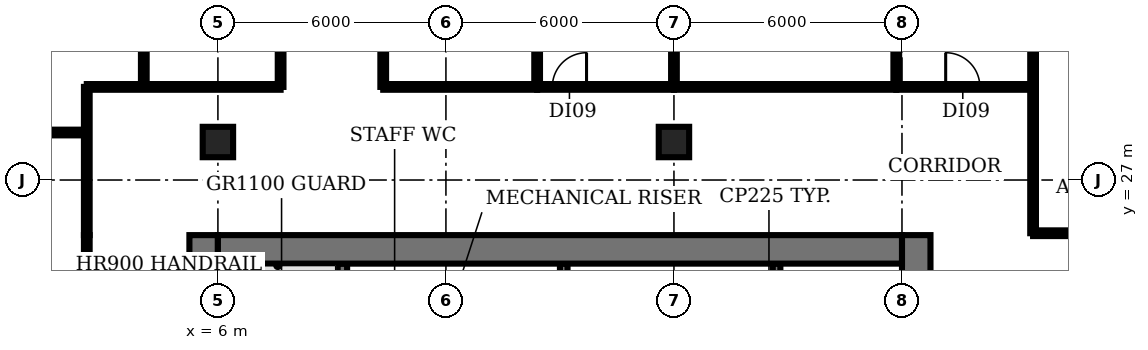
"""IFC4 building model, lengths in metres.
Left out: names, types, materials, properties, quantities, classifications, styles, units other than length and angle.
Written with IfcOpenShell. Run it as: python <this file> out.ifc"""

import sys

from ifc_helpers import new_model, si_unit, direction, frame, frame_2d, origin, origin_2d, place, context, subcontext, project, spatial, rectangle, extrude, element, fill, save


model = new_model("IFC4")
c1 = context("Model", 3, precision=1e-05, world=origin(), true_north=direction((0.0, 1.0)))
c2 = subcontext(c1, "Body", "Model", "MODEL_VIEW")
j1 = project(units=[si_unit("LENGTHUNIT", "METRE"), si_unit("PLANEANGLEUNIT", "RADIAN")], contexts=[c1])
p1 = place(None, origin())
s1 = spatial("IfcSite", under=j1, at=p1, CompositionType="ELEMENT")
p2 = place(p1, origin())
s2 = spatial("IfcBuilding", under=s1, at=p2, CompositionType="ELEMENT")
p3 = place(p2, frame((0.0, 0.0, 100.4)))
s3 = spatial("IfcBuildingStorey", under=s2, at=p3, CompositionType="ELEMENT", Elevation=100.4)
for number, where, z_axis, x_axis in (
    (1, (6.0, 28.0, 0.0), (0.0, 0.0, 1.0), (1.0, 0.0, 0.0)),
    (2, (18.0, 28.0, 0.0), (0.0, 0.0, 1.0), (1.0, 0.0, 0.0)),
):
    element("IfcColumn", number, at=place(p3, frame(where, z_axis=z_axis, x_axis=x_axis)), inside=s3, PredefinedType="COLUMN", context=c2, shape_type="SweptSolid", body=[
        extrude(rectangle(XDim=0.8, YDim=0.8, at=origin_2d()), origin(), (0.0, 0.0, 1.0), 3.85),
    ])
p4 = place(p3, frame((9.275, 18.375, 0.0), z_axis=(0.0, 0.0, 1.0), x_axis=(0.0, 1.0, 0.0)))
e3 = element("IfcWall", 3, at=p4, inside=s3, PredefinedType="SHEAR", context=c2, shape_type="SweptSolid", body=[
    extrude(rectangle(XDim=6.425, YDim=0.25, at=frame_2d((3.212, 0.0))), origin(), (0.0, 0.0, 1.0), 3.85),
])
for number, where, z_axis, x_axis in (
    (4, (15.1, 22.9, 0.0), (0.0, 0.0, 1.0), (0.0, 1.0, 0.0)),
    (5, (20.7, 22.9, 0.0), (0.0, 0.0, 1.0), (0.0, 1.0, 0.0)),
):
    element("IfcWall", number, at=place(p3, frame(where, z_axis=z_axis, x_axis=x_axis)), inside=s3, PredefinedType="SHEAR", context=c2, shape_type="SweptSolid", body=[
        extrude(rectangle(XDim=1.9, YDim=0.2, at=frame_2d((0.95, 0.0))), origin(), (0.0, 0.0, 1.0), 3.85),
    ])
p5 = place(p3, frame((5.625, 4.47, 0.0), z_axis=(0.0, 0.0, 1.0), x_axis=(0.0, 1.0, 0.0)))
e6 = element("IfcWall", 6, at=p5, inside=s3, PredefinedType="SHEAR", context=c2, shape_type="SweptSolid", body=[
    extrude(rectangle(XDim=21.08, YDim=0.75, at=frame_2d((10.54, 0.0))), origin(), (0.0, 0.0, 1.0), 3.85),
])
p6 = place(p5, frame((1.18, 0.0, 0.0)))
e7 = element("IfcOpeningElement", 7, at=p6, cuts=e6, PredefinedType="OPENING", context=c2, shape_type="SweptSolid", body=[
    extrude(rectangle(XDim=1.5, YDim=2.1, at=frame_2d((0.75, 1.05))), frame((0.0, 0.385, 0.0), z_axis=(0.0, -1.0, 0.0), x_axis=(1.0, 0.0, 0.0)), (0.0, 0.0, 1.0), 0.77),
])
p7 = place(p5, frame((7.63, 0.0, 0.0)))
e8 = element("IfcOpeningElement", 8, at=p7, cuts=e6, PredefinedType="OPENING", context=c2, shape_type="SweptSolid", body=[
    extrude(rectangle(XDim=1.2, YDim=2.1, at=frame_2d((0.6, 1.05))), frame((0.0, 0.385, 0.0), z_axis=(0.0, -1.0, 0.0), x_axis=(1.0, 0.0, 0.0)), (0.0, 0.0, 1.0), 0.77),
])
p8 = place(p5, frame((14.18, 0.0, 0.0)))
e9 = element("IfcOpeningElement", 9, at=p8, cuts=e6, PredefinedType="OPENING", context=c2, shape_type="SweptSolid", body=[
    extrude(rectangle(XDim=1.2, YDim=2.1, at=frame_2d((0.6, 1.05))), frame((0.0, 0.385, 0.0), z_axis=(0.0, -1.0, 0.0), x_axis=(1.0, 0.0, 0.0)), (0.0, 0.0, 1.0), 0.77),
])
p9 = place(p3, frame((24.375, 25.55, 0.0), z_axis=(0.0, 0.0, 1.0), x_axis=(0.0, -1.0, 0.0)))
e10 = element("IfcWall", 10, at=p9, inside=s3, PredefinedType="SHEAR", context=c2, shape_type="SweptSolid", body=[
    extrude(rectangle(XDim=21.13, YDim=0.75, at=frame_2d((10.565, 0.0))), origin(), (0.0, 0.0, 1.0), 3.85),
])
p10 = place(p9, frame((18.4, 0.0, 0.0)))
e11 = element("IfcOpeningElement", 11, at=p10, cuts=e10, PredefinedType="OPENING", context=c2, shape_type="SweptSolid", body=[
    extrude(rectangle(XDim=1.5, YDim=2.1, at=frame_2d((0.75, 1.05))), frame((0.0, 0.385, 0.0), z_axis=(0.0, -1.0, 0.0), x_axis=(1.0, 0.0, 0.0)), (0.0, 0.0, 1.0), 0.77),
])
p11 = place(p9, frame((12.3, 0.0, 0.0)))
e12 = element("IfcOpeningElement", 12, at=p11, cuts=e10, PredefinedType="OPENING", context=c2, shape_type="SweptSolid", body=[
    extrude(rectangle(XDim=0.9, YDim=2.1, at=frame_2d((0.45, 1.05))), frame((0.0, 0.385, 0.0), z_axis=(0.0, -1.0, 0.0), x_axis=(1.0, 0.0, 0.0)), (0.0, 0.0, 1.0), 0.77),
])
p12 = place(p9, frame((6.3, 0.0, 0.0)))
e13 = element("IfcOpeningElement", 13, at=p12, cuts=e10, PredefinedType="OPENING", context=c2, shape_type="SweptSolid", body=[
    extrude(rectangle(XDim=2.0, YDim=2.1, at=frame_2d((1.0, 1.05))), frame((0.0, 0.385, 0.0), z_axis=(0.0, -1.0, 0.0), x_axis=(1.0, 0.0, 0.0)), (0.0, 0.0, 1.0), 0.77),
])
p13 = place(p3, frame((6.0, 25.175, 0.0), z_axis=(0.0, 0.0, 1.0), x_axis=(1.0, 0.0, 0.0)))
e14 = element("IfcWall", 14, at=p13, inside=s3, PredefinedType="SHEAR", context=c2, shape_type="SweptSolid", body=[
    extrude(rectangle(XDim=18.0, YDim=0.75, at=frame_2d((9.0, 0.0))), origin(), (0.0, 0.0, 1.0), 3.85),
])
p14 = place(p3, frame((-0.98, 28.25, 0.0), z_axis=(0.0, 0.0, 1.0), x_axis=(1.0, 0.0, 0.0)))
e15 = element("IfcWall", 15, at=p14, inside=s3, PredefinedType="PARTITIONING", context=c2, shape_type="SweptSolid", body=[
    extrude(rectangle(XDim=3.53, YDim=0.15, at=frame_2d((1.765, 0.0))), origin(), (0.0, 0.0, 1.0), 2.83),
])
p15 = place(p3, frame((2.55, 6.34, 0.0), z_axis=(0.0, 0.0, 1.0), x_axis=(0.0, 1.0, 0.0)))
e16 = element("IfcWall", 16, at=p15, inside=s3, PredefinedType="PARTITIONING", context=c2, shape_type="SweptSolid", body=[
    extrude(rectangle(XDim=19.21, YDim=0.15, at=frame_2d((9.605, 0.0))), origin(), (0.0, 0.0, 1.0), 2.83),
])
p16 = place(p15, frame((7.31, 0.0, 0.0)))
e17 = element("IfcOpeningElement", 17, at=p16, cuts=e16, PredefinedType="OPENING", context=c2, shape_type="SweptSolid", body=[
    extrude(rectangle(XDim=1.2, YDim=2.1, at=frame_2d((0.6, 1.05))), frame((0.0, 0.085, 0.0), z_axis=(0.0, -1.0, 0.0), x_axis=(1.0, 0.0, 0.0)), (0.0, 0.0, 1.0), 0.17),
])
p17 = place(p3, frame((2.55, 25.55, 0.0), z_axis=(0.0, 0.0, 1.0), x_axis=(0.0, 1.0, 0.0)))
e18 = element("IfcWall", 18, at=p17, inside=s3, PredefinedType="PARTITIONING", context=c2, shape_type="SweptSolid", body=[
    extrude(rectangle(XDim=3.9, YDim=0.15, at=frame_2d((1.95, 0.0))), origin(), (0.0, 0.0, 1.0), 2.83),
])
p18 = place(p3, frame((2.55, 29.45, 0.0), z_axis=(0.0, 0.0, 1.0), x_axis=(1.0, 0.0, 0.0)))
e19 = element("IfcWall", 19, at=p18, inside=s3, PredefinedType="PARTITIONING", context=c2, shape_type="SweptSolid", body=[
    extrude(rectangle(XDim=5.1, YDim=0.15, at=frame_2d((2.55, 0.0))), origin(), (0.0, 0.0, 1.0), 2.83),
])
p19 = place(p3, frame((4.05, 29.45, 0.0), z_axis=(0.0, 0.0, 1.0), x_axis=(0.0, 1.0, 0.0)))
e20 = element("IfcWall", 20, at=p19, inside=s3, PredefinedType="PARTITIONING", context=c2, shape_type="SweptSolid", body=[
    extrude(rectangle(XDim=4.8, YDim=0.15, at=frame_2d((2.4, 0.0))), origin(), (0.0, 0.0, 1.0), 2.83),
])
p20 = place(p3, frame((7.65, 29.45, 0.0), z_axis=(0.0, 0.0, 1.0), x_axis=(0.0, 1.0, 0.0)))
e21 = element("IfcWall", 21, at=p20, inside=s3, PredefinedType="PARTITIONING", context=c2, shape_type="SweptSolid", body=[
    extrude(rectangle(XDim=4.8, YDim=0.15, at=frame_2d((2.4, 0.0))), origin(), (0.0, 0.0, 1.0), 2.83),
])
p21 = place(p20, frame((1.9, 0.0, 0.0)))
e22 = element("IfcOpeningElement", 22, at=p21, cuts=e21, PredefinedType="OPENING", context=c2, shape_type="SweptSolid", body=[
    extrude(rectangle(XDim=0.9, YDim=2.1, at=frame_2d((0.45, 1.05))), frame((0.0, 0.085, 0.0), z_axis=(0.0, -1.0, 0.0), x_axis=(1.0, 0.0, 0.0)), (0.0, 0.0, 1.0), 0.17),
])
p22 = place(p3, frame((10.35, 29.45, 0.0), z_axis=(0.0, 0.0, 1.0), x_axis=(0.0, 1.0, 0.0)))
e23 = element("IfcWall", 23, at=p22, inside=s3, PredefinedType="PARTITIONING", context=c2, shape_type="SweptSolid", body=[
    extrude(rectangle(XDim=4.8, YDim=0.15, at=frame_2d((2.4, 0.0))), origin(), (0.0, 0.0, 1.0), 2.83),
])
p23 = place(p3, frame((10.35, 29.45, 0.0), z_axis=(0.0, 0.0, 1.0), x_axis=(1.0, 0.0, 0.0)))
e24 = element("IfcWall", 24, at=p23, inside=s3, PredefinedType="PARTITIONING", context=c2, shape_type="SweptSolid", body=[
    extrude(rectangle(XDim=4.05, YDim=0.15, at=frame_2d((2.025, 0.0))), origin(), (0.0, 0.0, 1.0), 2.83),
])
p24 = place(p3, frame((14.4, 29.45, 0.0), z_axis=(0.0, 0.0, 1.0), x_axis=(0.0, 1.0, 0.0)))
e25 = element("IfcWall", 25, at=p24, inside=s3, PredefinedType="PARTITIONING", context=c2, shape_type="SweptSolid", body=[
    extrude(rectangle(XDim=4.8, YDim=0.15, at=frame_2d((2.4, 0.0))), origin(), (0.0, 0.0, 1.0), 2.83),
])
p25 = place(p3, frame((14.4, 29.45, 0.0), z_axis=(0.0, 0.0, 1.0), x_axis=(1.0, 0.0, 0.0)))
e26 = element("IfcWall", 26, at=p25, inside=s3, PredefinedType="PARTITIONING", context=c2, shape_type="SweptSolid", body=[
    extrude(rectangle(XDim=3.6, YDim=0.15, at=frame_2d((1.8, 0.0))), origin(), (0.0, 0.0, 1.0), 2.83),
])
p26 = place(p25, frame((0.4, 0.0, 0.0)))
e27 = element("IfcOpeningElement", 27, at=p26, cuts=e26, PredefinedType="OPENING", context=c2, shape_type="SweptSolid", body=[
    extrude(rectangle(XDim=0.9, YDim=2.1, at=frame_2d((0.45, 1.05))), frame((0.0, 0.085, 0.0), z_axis=(0.0, -1.0, 0.0), x_axis=(1.0, 0.0, 0.0)), (0.0, 0.0, 1.0), 0.17),
])
p27 = place(p3, frame((18.0, 29.45, 0.0), z_axis=(0.0, 0.0, 1.0), x_axis=(0.0, 1.0, 0.0)))
e28 = element("IfcWall", 28, at=p27, inside=s3, PredefinedType="PARTITIONING", context=c2, shape_type="SweptSolid", body=[
    extrude(rectangle(XDim=4.8, YDim=0.15, at=frame_2d((2.4, 0.0))), origin(), (0.0, 0.0, 1.0), 2.83),
])
p28 = place(p3, frame((18.0, 29.45, 0.0), z_axis=(0.0, 0.0, 1.0), x_axis=(1.0, 0.0, 0.0)))
e29 = element("IfcWall", 29, at=p28, inside=s3, PredefinedType="PARTITIONING", context=c2, shape_type="SweptSolid", body=[
    extrude(rectangle(XDim=5.85, YDim=0.15, at=frame_2d((2.925, 0.0))), origin(), (0.0, 0.0, 1.0), 2.83),
])
p29 = place(p3, frame((23.85, 29.45, 0.0), z_axis=(0.0, 0.0, 1.0), x_axis=(0.0, 1.0, 0.0)))
e30 = element("IfcWall", 30, at=p29, inside=s3, PredefinedType="PARTITIONING", context=c2, shape_type="SweptSolid", body=[
    extrude(rectangle(XDim=4.8, YDim=0.15, at=frame_2d((2.4, 0.0))), origin(), (0.0, 0.0, 1.0), 2.83),
])
p30 = place(p3, frame((23.85, 29.45, 0.0), z_axis=(0.0, 0.0, 1.0), x_axis=(1.0, 0.0, 0.0)))
e31 = element("IfcWall", 31, at=p30, inside=s3, PredefinedType="PARTITIONING", context=c2, shape_type="SweptSolid", body=[
    extrude(rectangle(XDim=3.6, YDim=0.15, at=frame_2d((1.8, 0.0))), origin(), (0.0, 0.0, 1.0), 2.83),
])
p31 = place(p30, frame((1.3, 0.0, 0.0)))
e32 = element("IfcOpeningElement", 32, at=p31, cuts=e31, PredefinedType="OPENING", context=c2, shape_type="SweptSolid", body=[
    extrude(rectangle(XDim=0.9, YDim=2.1, at=frame_2d((0.45, 1.05))), frame((0.0, 0.085, 0.0), z_axis=(0.0, -1.0, 0.0), x_axis=(1.0, 0.0, 0.0)), (0.0, 0.0, 1.0), 0.17),
])
p32 = place(p3, frame((27.45, 25.6, 0.0), z_axis=(0.0, 0.0, 1.0), x_axis=(0.0, 1.0, 0.0)))
e33 = element("IfcWall", 33, at=p32, inside=s3, PredefinedType="PARTITIONING", context=c2, shape_type="SweptSolid", body=[
    extrude(rectangle(XDim=3.85, YDim=0.15, at=frame_2d((1.925, 0.0))), origin(), (0.0, 0.0, 1.0), 2.83),
])
p33 = place(p3, frame((27.45, 25.6, 0.0), z_axis=(0.0, 0.0, 1.0), x_axis=(1.0, 0.0, 0.0)))
e34 = element("IfcWall", 34, at=p33, inside=s3, PredefinedType="PARTITIONING", context=c2, shape_type="SweptSolid", body=[
    extrude(rectangle(XDim=8.55, YDim=0.15, at=frame_2d((4.275, 0.0))), origin(), (0.0, 0.0, 1.0), 2.83),
])
p34 = place(p33, frame((4.15, 0.0, 0.0)))
e35 = element("IfcOpeningElement", 35, at=p34, cuts=e34, PredefinedType="OPENING", context=c2, shape_type="SweptSolid", body=[
    extrude(rectangle(XDim=0.9, YDim=2.1, at=frame_2d((0.45, 1.05))), frame((0.0, 0.085, 0.0), z_axis=(0.0, -1.0, 0.0), x_axis=(1.0, 0.0, 0.0)), (0.0, 0.0, 1.0), 0.17),
])
p35 = place(p3, frame((27.45, 29.45, 0.0), z_axis=(0.0, 0.0, 1.0), x_axis=(0.0, 1.0, 0.0)))
e36 = element("IfcWall", 36, at=p35, inside=s3, PredefinedType="PARTITIONING", context=c2, shape_type="SweptSolid", body=[
    extrude(rectangle(XDim=2.74, YDim=0.15, at=frame_2d((1.37, 0.0))), origin(), (0.0, 0.0, 1.0), 2.83),
])
p36 = place(p26, origin())
e37 = element("IfcDoor", 37, at=p36, inside=s3, OperationType="SINGLE_SWING_RIGHT", PredefinedType="DOOR", context=c2, shape_type="SweptSolid", body=[
    extrude(rectangle(XDim=0.9, YDim=2.1, at=frame_2d((0.45, 1.05))), frame((0.0, 0.025, 0.0), z_axis=(0.0, -1.0, 0.0), x_axis=(1.0, 0.0, 0.0)), (0.0, 0.0, 1.0), 0.05),
])
fill(e27, e37)
p37 = place(p31, origin())
e38 = element("IfcDoor", 38, at=p37, inside=s3, OperationType="SINGLE_SWING_LEFT", PredefinedType="DOOR", context=c2, shape_type="SweptSolid", body=[
    extrude(rectangle(XDim=0.9, YDim=2.1, at=frame_2d((0.45, 1.05))), frame((0.0, 0.025, 0.0), z_axis=(0.0, -1.0, 0.0), x_axis=(1.0, 0.0, 0.0)), (0.0, 0.0, 1.0), 0.05),
])
fill(e32, e38)
save(model, sys.argv[1])
